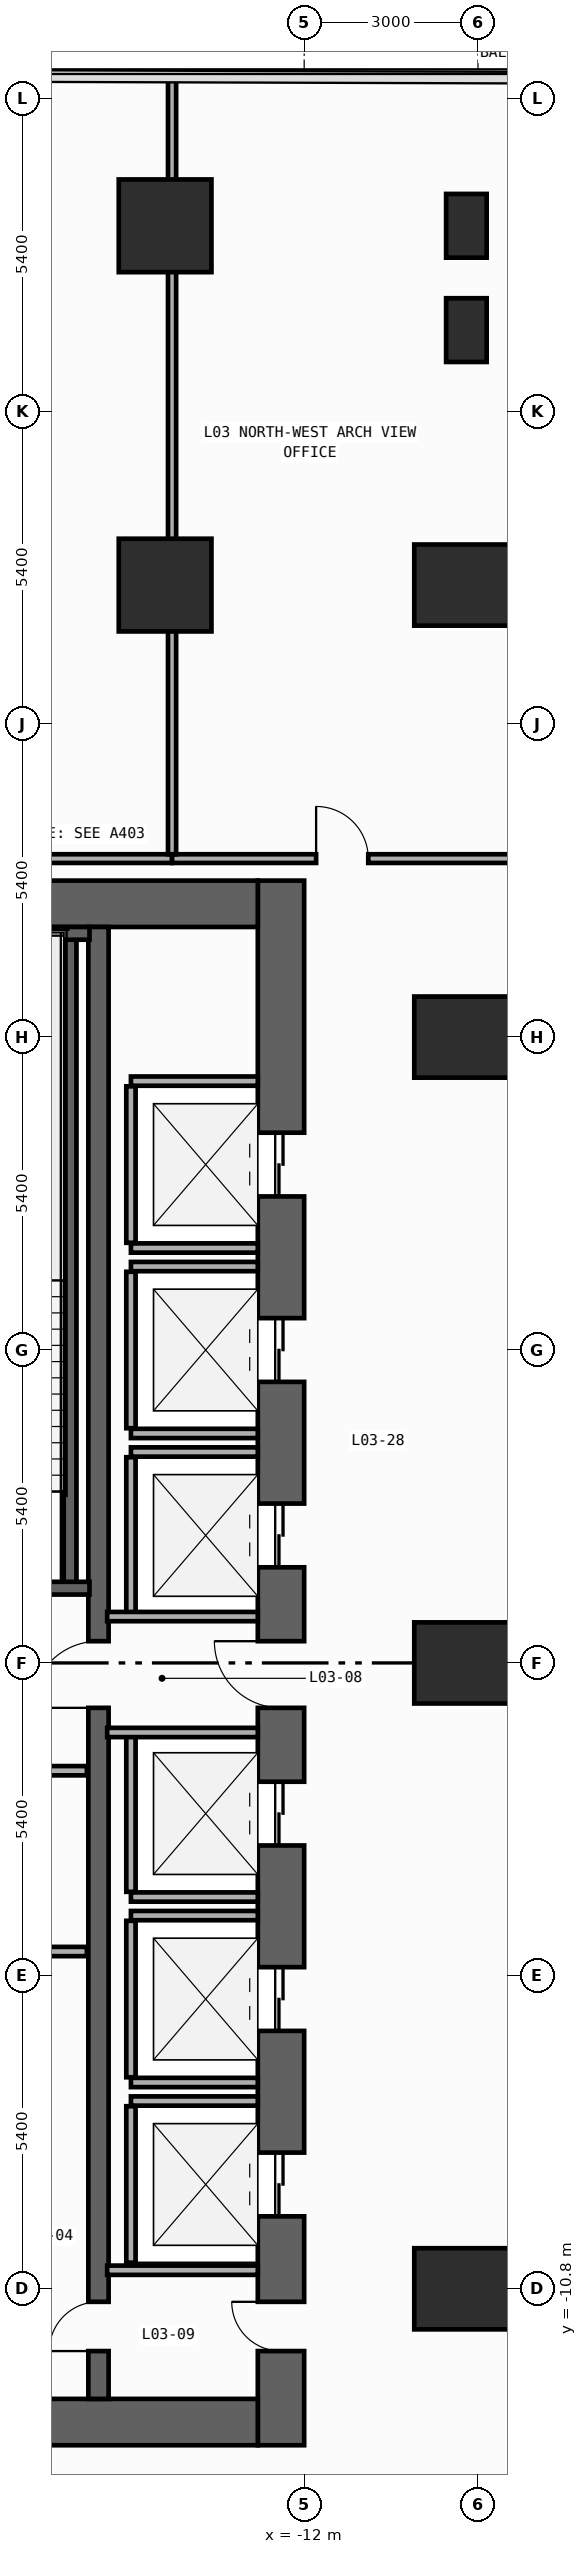
"""IFC4 building model, lengths in metres.
Left out: names, types, materials, properties, quantities, classifications, styles, units other than length and angle.
Written with IfcOpenShell. Run it as: python <this file> out.ifc"""

import sys

from ifc_helpers import new_model, si_unit, direction, frame, frame_2d, origin, origin_2d, place, context, subcontext, project, spatial, rectangle, extrude, element, fill, save


model = new_model("IFC4")
c1 = context("Model", 3, precision=1e-05, world=origin(), true_north=direction((0.0, 1.0)))
c2 = subcontext(c1, "Body", "Model", "MODEL_VIEW")
j1 = project(units=[si_unit("LENGTHUNIT", "METRE"), si_unit("PLANEANGLEUNIT", "RADIAN")], contexts=[c1])
p1 = place(None, origin())
s1 = spatial("IfcSite", under=j1, at=p1, CompositionType="ELEMENT")
p2 = place(p1, origin())
s2 = spatial("IfcBuilding", under=s1, at=p2, CompositionType="ELEMENT")
p3 = place(p2, frame((0.0, 0.0, 11.0)))
s3 = spatial("IfcBuildingStorey", under=s2, at=p3, CompositionType="ELEMENT", Elevation=11.0)
p4 = place(p3, frame((-12.4, -13.5, 0.0), z_axis=(0.0, 0.0, 1.0), x_axis=(0.0, 1.0, 0.0)))
e1 = element("IfcWall", 1, at=p4, inside=s3, PredefinedType="SHEAR", context=c2, shape_type="SweptSolid", body=[
    extrude(rectangle(XDim=27.0, YDim=0.8, at=frame_2d((13.5, 0.0))), origin(), (0.0, 0.0, 1.0), 4.7),
])
p5 = place(p4, frame((21.55, 0.0, 0.0)))
e2 = element("IfcOpeningElement", 2, at=p5, cuts=e1, PredefinedType="OPENING", context=c2, shape_type="SweptSolid", body=[
    extrude(rectangle(XDim=1.1, YDim=2.2, at=frame_2d((0.55, 1.1))), frame((0.0, 0.41, 0.0), z_axis=(0.0, -1.0, 0.0), x_axis=(1.0, 0.0, 0.0)), (0.0, 0.0, 1.0), 0.82),
])
p6 = place(p4, frame((18.35, 0.0, 0.0)))
e3 = element("IfcOpeningElement", 3, at=p6, cuts=e1, PredefinedType="OPENING", context=c2, shape_type="SweptSolid", body=[
    extrude(rectangle(XDim=1.1, YDim=2.2, at=frame_2d((0.55, 1.1))), frame((0.0, 0.41, 0.0), z_axis=(0.0, -1.0, 0.0), x_axis=(1.0, 0.0, 0.0)), (0.0, 0.0, 1.0), 0.82),
])
p7 = place(p4, frame((15.15, 0.0, 0.0)))
e4 = element("IfcOpeningElement", 4, at=p7, cuts=e1, PredefinedType="OPENING", context=c2, shape_type="SweptSolid", body=[
    extrude(rectangle(XDim=1.1, YDim=2.2, at=frame_2d((0.55, 1.1))), frame((0.0, 0.41, 0.0), z_axis=(0.0, -1.0, 0.0), x_axis=(1.0, 0.0, 0.0)), (0.0, 0.0, 1.0), 0.82),
])
p8 = place(p4, frame((10.35, 0.0, 0.0)))
e5 = element("IfcOpeningElement", 5, at=p8, cuts=e1, PredefinedType="OPENING", context=c2, shape_type="SweptSolid", body=[
    extrude(rectangle(XDim=1.1, YDim=2.2, at=frame_2d((0.55, 1.1))), frame((0.0, 0.41, 0.0), z_axis=(0.0, -1.0, 0.0), x_axis=(1.0, 0.0, 0.0)), (0.0, 0.0, 1.0), 0.82),
])
p9 = place(p4, frame((7.15, 0.0, 0.0)))
e6 = element("IfcOpeningElement", 6, at=p9, cuts=e1, PredefinedType="OPENING", context=c2, shape_type="SweptSolid", body=[
    extrude(rectangle(XDim=1.1, YDim=2.2, at=frame_2d((0.55, 1.1))), frame((0.0, 0.41, 0.0), z_axis=(0.0, -1.0, 0.0), x_axis=(1.0, 0.0, 0.0)), (0.0, 0.0, 1.0), 0.82),
])
p10 = place(p4, frame((3.95, 0.0, 0.0)))
e7 = element("IfcOpeningElement", 7, at=p10, cuts=e1, PredefinedType="OPENING", context=c2, shape_type="SweptSolid", body=[
    extrude(rectangle(XDim=1.1, YDim=2.2, at=frame_2d((0.55, 1.1))), frame((0.0, 0.41, 0.0), z_axis=(0.0, -1.0, 0.0), x_axis=(1.0, 0.0, 0.0)), (0.0, 0.0, 1.0), 0.82),
])
p11 = place(p4, frame((12.725, 0.0, 0.0)))
e8 = element("IfcOpeningElement", 8, at=p11, cuts=e1, PredefinedType="OPENING", context=c2, shape_type="SweptSolid", body=[
    extrude(rectangle(XDim=1.15, YDim=2.2, at=frame_2d((0.575, 1.1))), frame((0.0, 0.41, 0.0), z_axis=(0.0, -1.0, 0.0), x_axis=(1.0, 0.0, 0.0)), (0.0, 0.0, 1.0), 0.82),
])
p12 = place(p4, frame((1.625, 0.0, 0.0)))
e9 = element("IfcOpeningElement", 9, at=p12, cuts=e1, PredefinedType="OPENING", context=c2, shape_type="SweptSolid", body=[
    extrude(rectangle(XDim=0.85, YDim=2.1, at=frame_2d((0.425, 1.05))), frame((0.0, 0.41, 0.0), z_axis=(0.0, -1.0, 0.0), x_axis=(1.0, 0.0, 0.0)), (0.0, 0.0, 1.0), 0.82),
])
for number, where, z_axis, x_axis in (
    (10, (-19.6, -13.1, 0.0), (0.0, 0.0, 1.0), (1.0, 0.0, 0.0)),
    (11, (-19.6, 13.1, 0.0), (0.0, 0.0, 1.0), (1.0, 0.0, 0.0)),
):
    element("IfcWall", number, at=place(p3, frame(where, z_axis=z_axis, x_axis=x_axis)), inside=s3, PredefinedType="SHEAR", context=c2, shape_type="SweptSolid", body=[
        extrude(rectangle(XDim=6.8, YDim=0.8, at=frame_2d((3.4, 0.0))), origin(), (0.0, 0.0, 1.0), 4.7),
    ])
p13 = place(p3, frame((-15.55, -12.7, 0.0), z_axis=(0.0, 0.0, 1.0), x_axis=(0.0, 1.0, 0.0)))
e12 = element("IfcWall", 12, at=p13, inside=s3, PredefinedType="SHEAR", context=c2, shape_type="SweptSolid", body=[
    extrude(rectangle(XDim=25.4, YDim=0.35, at=frame_2d((12.7, 0.0))), origin(), (0.0, 0.0, 1.0), 4.7),
])
p14 = place(p13, frame((11.925, 0.0, 0.0)))
e13 = element("IfcOpeningElement", 13, at=p14, cuts=e12, PredefinedType="OPENING", context=c2, shape_type="SweptSolid", body=[
    extrude(rectangle(XDim=1.15, YDim=2.2, at=frame_2d((0.575, 1.1))), frame((0.0, 0.185, 0.0), z_axis=(0.0, -1.0, 0.0), x_axis=(1.0, 0.0, 0.0)), (0.0, 0.0, 1.0), 0.37),
])
p15 = place(p13, frame((0.825, 0.0, 0.0)))
e14 = element("IfcOpeningElement", 14, at=p15, cuts=e12, PredefinedType="OPENING", context=c2, shape_type="SweptSolid", body=[
    extrude(rectangle(XDim=0.85, YDim=2.1, at=frame_2d((0.425, 1.05))), frame((0.0, 0.185, 0.0), z_axis=(0.0, -1.0, 0.0), x_axis=(1.0, 0.0, 0.0)), (0.0, 0.0, 1.0), 0.37),
])
p16 = place(p3, frame((-16.04, 1.29, 0.0), z_axis=(0.0, 0.0, 1.0), x_axis=(0.0, 1.0, 0.0)))
e15 = element("IfcWall", 15, at=p16, inside=s3, PredefinedType="SHEAR", context=c2, shape_type="SweptSolid", body=[
    extrude(rectangle(XDim=11.3, YDim=0.22, at=frame_2d((5.65, 0.0))), origin(), (0.0, 0.0, 1.0), 4.7),
])
p17 = place(p3, frame((-19.62, 12.59, 0.0), z_axis=(0.0, 0.0, 1.0), x_axis=(1.0, 0.0, 0.0)))
e16 = element("IfcWall", 16, at=p17, inside=s3, PredefinedType="SHEAR", context=c2, shape_type="SweptSolid", body=[
    extrude(rectangle(XDim=3.915, YDim=0.22, at=frame_2d((1.958, 0.0))), origin(), (0.0, 0.0, 1.0), 4.7),
])
p18 = place(p3, frame((-19.62, 1.29, 0.0), z_axis=(0.0, 0.0, 1.0), x_axis=(1.0, 0.0, 0.0)))
e17 = element("IfcWall", 17, at=p18, inside=s3, PredefinedType="SHEAR", context=c2, shape_type="SweptSolid", body=[
    extrude(rectangle(XDim=3.915, YDim=0.22, at=frame_2d((1.958, 0.0))), origin(), (0.0, 0.0, 1.0), 4.7),
])
p19 = place(p18, frame((1.08, 0.0, 0.0)))
e18 = element("IfcOpeningElement", 18, at=p19, cuts=e17, PredefinedType="OPENING", context=c2, shape_type="SweptSolid", body=[
    extrude(rectangle(XDim=1.1, YDim=2.2, at=frame_2d((0.55, 1.1))), frame((0.0, 0.12, 0.0), z_axis=(0.0, -1.0, 0.0), x_axis=(1.0, 0.0, 0.0)), (0.0, 0.0, 1.0), 0.24),
])
for number, where, z_axis, x_axis in (
    (19, (-9.2, -10.8, 0.0), (0.0, 0.0, 1.0), (1.0, 0.0, 0.0)),
    (20, (-9.2, 0.0, 0.0), (0.0, 0.0, 1.0), (1.0, 0.0, 0.0)),
    (21, (-9.2, 10.8, 0.0), (0.0, 0.0, 1.0), (1.0, 0.0, 0.0)),
    (22, (-9.2, 18.6, 0.0), (0.0, 0.0, 1.0), (1.0, 0.0, 0.0)),
):
    element("IfcColumn", number, at=place(p3, frame(where, z_axis=z_axis, x_axis=x_axis)), inside=s3, PredefinedType="COLUMN", context=c2, shape_type="SweptSolid", body=[
        extrude(rectangle(XDim=1.8, YDim=1.4, at=origin_2d()), origin(), (0.0, 0.0, 1.0), 5.0),
    ])
p20 = place(p3, frame((-14.4, 18.6, 0.0), z_axis=(0.0, 0.0, 1.0), x_axis=(1.0, 0.0, 0.0)))
e23 = element("IfcColumn", 23, at=p20, inside=s3, PredefinedType="COLUMN", context=c2, shape_type="SweptSolid", body=[
    extrude(rectangle(XDim=1.6, YDim=1.6, at=origin_2d()), origin(), (0.0, 0.0, 1.0), 5.0),
])
p21 = place(p3, frame((-9.2, 24.8, 0.0), z_axis=(0.0, 0.0, 1.0), x_axis=(1.0, 0.0, 0.0)))
e24 = element("IfcColumn", 24, at=p21, inside=s3, PredefinedType="PILASTER", context=c2, shape_type="SweptSolid", body=[
    extrude(rectangle(XDim=0.7, YDim=1.1, at=origin_2d()), origin(), (0.0, 0.0, 1.0), 5.0),
])
p22 = place(p3, frame((-14.4, 24.8, 0.0), z_axis=(0.0, 0.0, 1.0), x_axis=(1.0, 0.0, 0.0)))
e25 = element("IfcColumn", 25, at=p22, inside=s3, PredefinedType="COLUMN", context=c2, shape_type="SweptSolid", body=[
    extrude(rectangle(XDim=1.6, YDim=1.6, at=origin_2d()), origin(), (0.0, 0.0, 1.0), 5.0),
])
p23 = place(p3, frame((-9.2, 23.0, 0.0), z_axis=(0.0, 0.0, 1.0), x_axis=(1.0, 0.0, 0.0)))
e26 = element("IfcColumn", 26, at=p23, inside=s3, PredefinedType="PILASTER", context=c2, shape_type="SweptSolid", body=[
    extrude(rectangle(XDim=0.7, YDim=1.1, at=origin_2d()), origin(), (0.0, 0.0, 1.0), 5.0),
])
for number, where, z_axis, x_axis in (
    (27, (-14.99, 7.16, 0.0), (0.0, 0.0, 1.0), (1.0, 0.0, 0.0)),
    (28, (-14.99, 10.04, 0.0), (0.0, 0.0, 1.0), (1.0, 0.0, 0.0)),
):
    element("IfcWall", number, at=place(p3, frame(where, z_axis=z_axis, x_axis=x_axis)), inside=s3, PredefinedType="STANDARD", context=c2, shape_type="SweptSolid", body=[
        extrude(rectangle(XDim=2.19, YDim=0.16, at=frame_2d((1.095, 0.0))), origin(), (0.0, 0.0, 1.0), 4.7),
    ])
p24 = place(p3, frame((-14.99, 7.25, 0.0), z_axis=(0.0, 0.0, 1.0), x_axis=(0.0, 1.0, 0.0)))
e29 = element("IfcWall", 29, at=p24, inside=s3, PredefinedType="STANDARD", context=c2, shape_type="SweptSolid", body=[
    extrude(rectangle(XDim=2.7, YDim=0.16, at=frame_2d((1.35, 0.0))), origin(), (0.0, 0.0, 1.0), 4.7),
])
for number, where, z_axis, x_axis in (
    (30, (-14.99, 3.96, 0.0), (0.0, 0.0, 1.0), (1.0, 0.0, 0.0)),
    (31, (-14.99, 6.84, 0.0), (0.0, 0.0, 1.0), (1.0, 0.0, 0.0)),
):
    element("IfcWall", number, at=place(p3, frame(where, z_axis=z_axis, x_axis=x_axis)), inside=s3, PredefinedType="STANDARD", context=c2, shape_type="SweptSolid", body=[
        extrude(rectangle(XDim=2.19, YDim=0.16, at=frame_2d((1.095, 0.0))), origin(), (0.0, 0.0, 1.0), 4.7),
    ])
p25 = place(p3, frame((-14.99, 4.05, 0.0), z_axis=(0.0, 0.0, 1.0), x_axis=(0.0, 1.0, 0.0)))
e32 = element("IfcWall", 32, at=p25, inside=s3, PredefinedType="STANDARD", context=c2, shape_type="SweptSolid", body=[
    extrude(rectangle(XDim=2.7, YDim=0.16, at=frame_2d((1.35, 0.0))), origin(), (0.0, 0.0, 1.0), 4.7),
])
p26 = place(p3, frame((-14.99, 3.64, 0.0), z_axis=(0.0, 0.0, 1.0), x_axis=(1.0, 0.0, 0.0)))
e33 = element("IfcWall", 33, at=p26, inside=s3, PredefinedType="STANDARD", context=c2, shape_type="SweptSolid", body=[
    extrude(rectangle(XDim=2.19, YDim=0.16, at=frame_2d((1.095, 0.0))), origin(), (0.0, 0.0, 1.0), 4.7),
])
p27 = place(p3, frame((-14.99, 0.85, 0.0), z_axis=(0.0, 0.0, 1.0), x_axis=(0.0, 1.0, 0.0)))
e34 = element("IfcWall", 34, at=p27, inside=s3, PredefinedType="STANDARD", context=c2, shape_type="SweptSolid", body=[
    extrude(rectangle(XDim=2.7, YDim=0.16, at=frame_2d((1.35, 0.0))), origin(), (0.0, 0.0, 1.0), 4.7),
])
p28 = place(p3, frame((-14.99, -4.04, 0.0), z_axis=(0.0, 0.0, 1.0), x_axis=(1.0, 0.0, 0.0)))
e35 = element("IfcWall", 35, at=p28, inside=s3, PredefinedType="STANDARD", context=c2, shape_type="SweptSolid", body=[
    extrude(rectangle(XDim=2.19, YDim=0.16, at=frame_2d((1.095, 0.0))), origin(), (0.0, 0.0, 1.0), 4.7),
])
p29 = place(p3, frame((-14.99, -3.95, 0.0), z_axis=(0.0, 0.0, 1.0), x_axis=(0.0, 1.0, 0.0)))
e36 = element("IfcWall", 36, at=p29, inside=s3, PredefinedType="STANDARD", context=c2, shape_type="SweptSolid", body=[
    extrude(rectangle(XDim=2.7, YDim=0.16, at=frame_2d((1.35, 0.0))), origin(), (0.0, 0.0, 1.0), 4.7),
])
for number, where, z_axis, x_axis in (
    (37, (-14.99, -7.24, 0.0), (0.0, 0.0, 1.0), (1.0, 0.0, 0.0)),
    (38, (-14.99, -4.36, 0.0), (0.0, 0.0, 1.0), (1.0, 0.0, 0.0)),
):
    element("IfcWall", number, at=place(p3, frame(where, z_axis=z_axis, x_axis=x_axis)), inside=s3, PredefinedType="STANDARD", context=c2, shape_type="SweptSolid", body=[
        extrude(rectangle(XDim=2.19, YDim=0.16, at=frame_2d((1.095, 0.0))), origin(), (0.0, 0.0, 1.0), 4.7),
    ])
p30 = place(p3, frame((-14.99, -7.15, 0.0), z_axis=(0.0, 0.0, 1.0), x_axis=(0.0, 1.0, 0.0)))
e39 = element("IfcWall", 39, at=p30, inside=s3, PredefinedType="STANDARD", context=c2, shape_type="SweptSolid", body=[
    extrude(rectangle(XDim=2.7, YDim=0.16, at=frame_2d((1.35, 0.0))), origin(), (0.0, 0.0, 1.0), 4.7),
])
p31 = place(p3, frame((-14.99, -7.56, 0.0), z_axis=(0.0, 0.0, 1.0), x_axis=(1.0, 0.0, 0.0)))
e40 = element("IfcWall", 40, at=p31, inside=s3, PredefinedType="STANDARD", context=c2, shape_type="SweptSolid", body=[
    extrude(rectangle(XDim=2.19, YDim=0.16, at=frame_2d((1.095, 0.0))), origin(), (0.0, 0.0, 1.0), 4.7),
])
p32 = place(p3, frame((-14.99, -10.35, 0.0), z_axis=(0.0, 0.0, 1.0), x_axis=(0.0, 1.0, 0.0)))
e41 = element("IfcWall", 41, at=p32, inside=s3, PredefinedType="STANDARD", context=c2, shape_type="SweptSolid", body=[
    extrude(rectangle(XDim=2.7, YDim=0.16, at=frame_2d((1.35, 0.0))), origin(), (0.0, 0.0, 1.0), 4.7),
])
p33 = place(p3, frame((-19.55, -1.86, 0.0), z_axis=(0.0, 0.0, 1.0), x_axis=(1.0, 0.0, 0.0)))
e42 = element("IfcWall", 42, at=p33, inside=s3, PredefinedType="STANDARD", context=c2, shape_type="SweptSolid", body=[
    extrude(rectangle(XDim=3.8, YDim=0.16, at=frame_2d((1.9, 0.0))), origin(), (0.0, 0.0, 1.0), 4.7),
])
p34 = place(p33, frame((1.18, 0.0, 0.0)))
e43 = element("IfcOpeningElement", 43, at=p34, cuts=e42, PredefinedType="OPENING", context=c2, shape_type="SweptSolid", body=[
    extrude(rectangle(XDim=1.15, YDim=2.2, at=frame_2d((0.575, 1.1))), frame((0.0, 0.09, 0.0), z_axis=(0.0, -1.0, 0.0), x_axis=(1.0, 0.0, 0.0)), (0.0, 0.0, 1.0), 0.18),
])
p35 = place(p3, frame((-19.55, -4.98, 0.0), z_axis=(0.0, 0.0, 1.0), x_axis=(1.0, 0.0, 0.0)))
e44 = element("IfcWall", 44, at=p35, inside=s3, PredefinedType="STANDARD", context=c2, shape_type="SweptSolid", body=[
    extrude(rectangle(XDim=3.8, YDim=0.16, at=frame_2d((1.9, 0.0))), origin(), (0.0, 0.0, 1.0), 4.7),
])
for number, where, z_axis, x_axis in (
    (45, (-15.4, 0.8, 0.0), (0.0, 0.0, 1.0), (1.0, 0.0, 0.0)),
    (46, (-15.4, -1.2, 0.0), (0.0, 0.0, 1.0), (1.0, 0.0, 0.0)),
    (47, (-15.4, -10.48, 0.0), (0.0, 0.0, 1.0), (1.0, 0.0, 0.0)),
):
    element("IfcWall", number, at=place(p3, frame(where, z_axis=z_axis, x_axis=x_axis)), inside=s3, PredefinedType="STANDARD", context=c2, shape_type="SweptSolid", body=[
        extrude(rectangle(XDim=2.6, YDim=0.16, at=frame_2d((1.3, 0.0))), origin(), (0.0, 0.0, 1.0), 4.7),
    ])
p36 = place(p3, frame((-24.445, 13.88, 0.0), z_axis=(0.0, 0.0, 1.0), x_axis=(1.0, 0.0, 0.0)))
e48 = element("IfcWall", 48, at=p36, inside=s3, PredefinedType="PARTITIONING", context=c2, shape_type="SweptSolid", body=[
    extrude(rectangle(XDim=10.165, YDim=0.15, at=frame_2d((5.083, 0.0))), origin(), (0.0, 0.0, 1.0), 4.7),
])
p37 = place(p36, frame((0.46, 0.0, 0.0)))
e49 = element("IfcOpeningElement", 49, at=p37, cuts=e48, PredefinedType="OPENING", context=c2, shape_type="SweptSolid", body=[
    extrude(rectangle(XDim=0.9, YDim=2.15, at=frame_2d((0.45, 1.075))), frame((0.0, 0.085, 0.0), z_axis=(0.0, -1.0, 0.0), x_axis=(1.0, 0.0, 0.0)), (0.0, 0.0, 1.0), 0.17),
])
p38 = place(p3, frame((-14.28, 13.88, 0.0), z_axis=(0.0, 0.0, 1.0), x_axis=(1.0, 0.0, 0.0)))
e50 = element("IfcWall", 50, at=p38, inside=s3, PredefinedType="PARTITIONING", context=c2, shape_type="SweptSolid", body=[
    extrude(rectangle(XDim=6.075, YDim=0.15, at=frame_2d((3.038, 0.0))), origin(), (0.0, 0.0, 1.0), 4.7),
])
p39 = place(p38, frame((2.486, 0.0, 0.0)))
e51 = element("IfcOpeningElement", 51, at=p39, cuts=e50, PredefinedType="OPENING", context=c2, shape_type="SweptSolid", body=[
    extrude(rectangle(XDim=0.9, YDim=2.15, at=frame_2d((0.45, 1.075))), frame((0.0, 0.085, 0.0), z_axis=(0.0, -1.0, 0.0), x_axis=(1.0, 0.0, 0.0)), (0.0, 0.0, 1.0), 0.17),
])
p40 = place(p3, frame((-14.28, 13.955, 0.0), z_axis=(0.0, 0.0, 1.0), x_axis=(0.0, 1.0, 0.0)))
e52 = element("IfcWall", 52, at=p40, inside=s3, PredefinedType="PARTITIONING", context=c2, shape_type="SweptSolid", body=[
    extrude(rectangle(XDim=13.425, YDim=0.14, at=frame_2d((6.713, 0.0))), origin(), (0.0, 0.0, 1.0), 3.8),
])
p41 = place(p5, origin())
e53 = element("IfcDoor", 53, at=p41, inside=s3, OperationType="DOUBLE_DOOR_SLIDING", PredefinedType="DOOR", context=c2, shape_type="SweptSolid", body=[
    extrude(rectangle(XDim=1.1, YDim=2.2, at=frame_2d((0.55, 1.1))), frame((0.0, 0.025, 0.0), z_axis=(0.0, -1.0, 0.0), x_axis=(1.0, 0.0, 0.0)), (0.0, 0.0, 1.0), 0.05),
])
fill(e2, e53)
p42 = place(p6, origin())
e54 = element("IfcDoor", 54, at=p42, inside=s3, OperationType="DOUBLE_DOOR_SLIDING", PredefinedType="DOOR", context=c2, shape_type="SweptSolid", body=[
    extrude(rectangle(XDim=1.1, YDim=2.2, at=frame_2d((0.55, 1.1))), frame((0.0, 0.025, 0.0), z_axis=(0.0, -1.0, 0.0), x_axis=(1.0, 0.0, 0.0)), (0.0, 0.0, 1.0), 0.05),
])
fill(e3, e54)
p43 = place(p7, origin())
e55 = element("IfcDoor", 55, at=p43, inside=s3, OperationType="DOUBLE_DOOR_SLIDING", PredefinedType="DOOR", context=c2, shape_type="SweptSolid", body=[
    extrude(rectangle(XDim=1.1, YDim=2.2, at=frame_2d((0.55, 1.1))), frame((0.0, 0.025, 0.0), z_axis=(0.0, -1.0, 0.0), x_axis=(1.0, 0.0, 0.0)), (0.0, 0.0, 1.0), 0.05),
])
fill(e4, e55)
p44 = place(p8, origin())
e56 = element("IfcDoor", 56, at=p44, inside=s3, OperationType="DOUBLE_DOOR_SLIDING", PredefinedType="DOOR", context=c2, shape_type="SweptSolid", body=[
    extrude(rectangle(XDim=1.1, YDim=2.2, at=frame_2d((0.55, 1.1))), frame((0.0, 0.025, 0.0), z_axis=(0.0, -1.0, 0.0), x_axis=(1.0, 0.0, 0.0)), (0.0, 0.0, 1.0), 0.05),
])
fill(e5, e56)
p45 = place(p9, origin())
e57 = element("IfcDoor", 57, at=p45, inside=s3, OperationType="DOUBLE_DOOR_SLIDING", PredefinedType="DOOR", context=c2, shape_type="SweptSolid", body=[
    extrude(rectangle(XDim=1.1, YDim=2.2, at=frame_2d((0.55, 1.1))), frame((0.0, 0.025, 0.0), z_axis=(0.0, -1.0, 0.0), x_axis=(1.0, 0.0, 0.0)), (0.0, 0.0, 1.0), 0.05),
])
fill(e6, e57)
p46 = place(p10, origin())
e58 = element("IfcDoor", 58, at=p46, inside=s3, OperationType="DOUBLE_DOOR_SLIDING", PredefinedType="DOOR", context=c2, shape_type="SweptSolid", body=[
    extrude(rectangle(XDim=1.1, YDim=2.2, at=frame_2d((0.55, 1.1))), frame((0.0, 0.025, 0.0), z_axis=(0.0, -1.0, 0.0), x_axis=(1.0, 0.0, 0.0)), (0.0, 0.0, 1.0), 0.05),
])
fill(e7, e58)
p47 = place(p11, origin())
e59 = element("IfcDoor", 59, at=p47, inside=s3, OperationType="SINGLE_SWING_RIGHT", PredefinedType="DOOR", context=c2, shape_type="SweptSolid", body=[
    extrude(rectangle(XDim=1.15, YDim=2.2, at=frame_2d((0.575, 1.1))), frame((0.0, 0.025, 0.0), z_axis=(0.0, -1.0, 0.0), x_axis=(1.0, 0.0, 0.0)), (0.0, 0.0, 1.0), 0.05),
])
fill(e8, e59)
p48 = place(p14, origin())
e60 = element("IfcDoor", 60, at=p48, inside=s3, OperationType="SINGLE_SWING_LEFT", PredefinedType="DOOR", context=c2, shape_type="SweptSolid", body=[
    extrude(rectangle(XDim=1.15, YDim=2.2, at=frame_2d((0.575, 1.1))), frame((0.0, 0.025, 0.0), z_axis=(0.0, -1.0, 0.0), x_axis=(1.0, 0.0, 0.0)), (0.0, 0.0, 1.0), 0.05),
])
fill(e13, e60)
p49 = place(p12, origin())
e61 = element("IfcDoor", 61, at=p49, inside=s3, OperationType="SINGLE_SWING_RIGHT", PredefinedType="DOOR", context=c2, shape_type="SweptSolid", body=[
    extrude(rectangle(XDim=0.85, YDim=2.1, at=frame_2d((0.425, 1.05))), frame((0.0, 0.025, 0.0), z_axis=(0.0, -1.0, 0.0), x_axis=(1.0, 0.0, 0.0)), (0.0, 0.0, 1.0), 0.05),
])
fill(e9, e61)
p50 = place(p15, origin())
e62 = element("IfcDoor", 62, at=p50, inside=s3, OperationType="SINGLE_SWING_LEFT", PredefinedType="DOOR", context=c2, shape_type="SweptSolid", body=[
    extrude(rectangle(XDim=0.85, YDim=2.1, at=frame_2d((0.425, 1.05))), frame((0.0, 0.025, 0.0), z_axis=(0.0, -1.0, 0.0), x_axis=(1.0, 0.0, 0.0)), (0.0, 0.0, 1.0), 0.05),
])
fill(e14, e62)
p51 = place(p39, origin())
e63 = element("IfcDoor", 63, at=p51, inside=s3, OperationType="SINGLE_SWING_LEFT", PredefinedType="DOOR", context=c2, shape_type="SweptSolid", body=[
    extrude(rectangle(XDim=0.9, YDim=2.15, at=frame_2d((0.45, 1.075))), frame((0.0, 0.025, 0.0), z_axis=(0.0, -1.0, 0.0), x_axis=(1.0, 0.0, 0.0)), (0.0, 0.0, 1.0), 0.05),
])
fill(e51, e63)
save(model, sys.argv[1])
